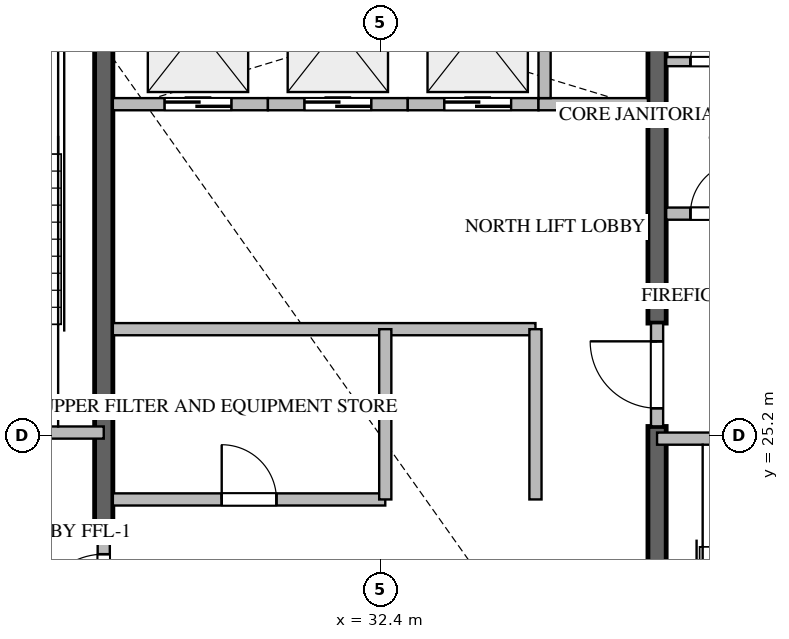
"""IFC4 building model, lengths in metres.
Left out: names, types, materials, properties, quantities, classifications, styles, units other than length and angle.
Written with IfcOpenShell. Run it as: python <this file> out.ifc"""

import sys

from ifc_helpers import new_model, si_unit, direction, frame, frame_2d, origin, place, context, subcontext, project, spatial, rectangle, extrude, source, transform, mapped, element, fill, save


model = new_model("IFC4")
c1 = context("Model", 3, precision=1e-05, world=origin(), true_north=direction((0.0, 1.0)))
c2 = subcontext(c1, "Body", "Model", "MODEL_VIEW")
j1 = project(units=[si_unit("LENGTHUNIT", "METRE"), si_unit("PLANEANGLEUNIT", "RADIAN")], contexts=[c1])
p1 = place(None, origin())
s1 = spatial("IfcSite", under=j1, at=p1, CompositionType="ELEMENT")
p2 = place(p1, origin())
s2 = spatial("IfcBuilding", under=s1, at=p2, CompositionType="ELEMENT")
p3 = place(p2, frame((0.0, 0.0, 214.3)))
s3 = spatial("IfcBuildingStorey", under=s2, at=p3, CompositionType="ELEMENT", Elevation=214.3)
p4 = place(p3, frame((27.85, 23.55, -0.26), z_axis=(0.0, 0.0, 1.0), x_axis=(0.0, 1.0, 0.0)))
e1 = element("IfcWall", 1, at=p4, inside=s3, PredefinedType="SHEAR", context=c2, shape_type="SweptSolid", body=[
    extrude(rectangle(XDim=9.875, YDim=0.3, at=frame_2d((4.938, 0.0))), origin(), (0.0, 0.0, 1.0), 3.848),
])
p5 = place(p3, frame((36.95, 16.975, -0.26), z_axis=(0.0, 0.0, 1.0), x_axis=(0.0, 1.0, 0.0)))
e2 = element("IfcWall", 2, at=p5, inside=s3, PredefinedType="SHEAR", context=c2, shape_type="SweptSolid", body=[
    extrude(rectangle(XDim=8.375, YDim=0.3, at=frame_2d((4.188, 0.0))), origin(), (0.0, 0.0, 1.0), 3.848),
])
p6 = place(p3, frame((36.95, 27.05, -0.26), z_axis=(0.0, 0.0, 1.0), x_axis=(0.0, 1.0, 0.0)))
e3 = element("IfcWall", 3, at=p6, inside=s3, PredefinedType="SHEAR", context=c2, shape_type="SweptSolid", body=[
    extrude(rectangle(XDim=6.375, YDim=0.3, at=frame_2d((3.188, 0.0))), origin(), (0.0, 0.0, 1.0), 3.848),
])
p7 = place(p3, frame((23.4, 25.25, 0.0), z_axis=(0.0, 0.0, 1.0), x_axis=(1.0, 0.0, 0.0)))
e4 = element("IfcWall", 4, at=p7, inside=s3, PredefinedType="STANDARD", context=c2, shape_type="SweptSolid", body=[
    extrude(rectangle(XDim=4.45, YDim=0.2, at=frame_2d((2.225, 0.0))), origin(), (0.0, 0.0, 1.0), 3.59),
])
p8 = place(p7, frame((1.65, 0.0, 0.0)))
e5 = element("IfcOpeningElement", 5, at=p8, cuts=e4, PredefinedType="OPENING", context=c2, shape_type="SweptSolid", body=[
    extrude(rectangle(XDim=1.1, YDim=2.15, at=frame_2d((0.55, 1.075))), frame((0.0, 0.11, 0.0), z_axis=(0.0, -1.0, 0.0), x_axis=(1.0, 0.0, 0.0)), (0.0, 0.0, 1.0), 0.22),
])
p9 = place(p3, frame((36.95, 25.15, 0.0), z_axis=(0.0, 0.0, 1.0), x_axis=(1.0, 0.0, 0.0)))
e6 = element("IfcWall", 6, at=p9, inside=s3, PredefinedType="STANDARD", context=c2, shape_type="SweptSolid", body=[
    extrude(rectangle(XDim=4.45, YDim=0.2, at=frame_2d((2.225, 0.0))), origin(), (0.0, 0.0, 1.0), 3.59),
])
p10 = place(p9, frame((1.65, 0.0, 0.0)))
e7 = element("IfcOpeningElement", 7, at=p10, cuts=e6, PredefinedType="OPENING", context=c2, shape_type="SweptSolid", body=[
    extrude(rectangle(XDim=1.1, YDim=2.15, at=frame_2d((0.55, 1.075))), frame((0.0, 0.11, 0.0), z_axis=(0.0, -1.0, 0.0), x_axis=(1.0, 0.0, 0.0)), (0.0, 0.0, 1.0), 0.22),
])
p11 = place(p3, frame((28.0, 30.65, 0.0), z_axis=(0.0, 0.0, 1.0), x_axis=(1.0, 0.0, 0.0)))
e8 = element("IfcWall", 8, at=p11, inside=s3, PredefinedType="STANDARD", context=c2, shape_type="SweptSolid", body=[
    extrude(rectangle(XDim=2.55, YDim=0.2, at=frame_2d((1.275, 0.0))), origin(), (0.0, 0.0, 1.0), 3.59),
])
p12 = place(p11, frame((0.85, 0.0, 0.0)))
e9 = element("IfcOpeningElement", 9, at=p12, cuts=e8, PredefinedType="OPENING", context=c2, shape_type="SweptSolid", body=[
    extrude(rectangle(XDim=1.1, YDim=2.2, at=frame_2d((0.55, 1.1))), frame((0.0, 0.11, 0.0), z_axis=(0.0, -1.0, 0.0), x_axis=(1.0, 0.0, 0.0)), (0.0, 0.0, 1.0), 0.22),
])
p13 = place(p3, frame((30.55, 30.65, 0.0), z_axis=(0.0, 0.0, 1.0), x_axis=(1.0, 0.0, 0.0)))
e10 = element("IfcWall", 10, at=p13, inside=s3, PredefinedType="STANDARD", context=c2, shape_type="SweptSolid", body=[
    extrude(rectangle(XDim=2.3, YDim=0.2, at=frame_2d((1.15, 0.0))), origin(), (0.0, 0.0, 1.0), 3.59),
])
p14 = place(p13, frame((0.6, 0.0, 0.0)))
e11 = element("IfcOpeningElement", 11, at=p14, cuts=e10, PredefinedType="OPENING", context=c2, shape_type="SweptSolid", body=[
    extrude(rectangle(XDim=1.1, YDim=2.2, at=frame_2d((0.55, 1.1))), frame((0.0, 0.11, 0.0), z_axis=(0.0, -1.0, 0.0), x_axis=(1.0, 0.0, 0.0)), (0.0, 0.0, 1.0), 0.22),
])
p15 = place(p3, frame((32.85, 30.65, 0.0), z_axis=(0.0, 0.0, 1.0), x_axis=(1.0, 0.0, 0.0)))
e12 = element("IfcWall", 12, at=p15, inside=s3, PredefinedType="STANDARD", context=c2, shape_type="SweptSolid", body=[
    extrude(rectangle(XDim=2.15, YDim=0.2, at=frame_2d((1.075, 0.0))), origin(), (0.0, 0.0, 1.0), 3.59),
])
p16 = place(p15, frame((0.6, 0.0, 0.0)))
e13 = element("IfcOpeningElement", 13, at=p16, cuts=e12, PredefinedType="OPENING", context=c2, shape_type="SweptSolid", body=[
    extrude(rectangle(XDim=1.1, YDim=2.2, at=frame_2d((0.55, 1.1))), frame((0.0, 0.11, 0.0), z_axis=(0.0, -1.0, 0.0), x_axis=(1.0, 0.0, 0.0)), (0.0, 0.0, 1.0), 0.22),
])
p17 = place(p3, frame((35.0, 30.65, 0.0), z_axis=(0.0, 0.0, 1.0), x_axis=(1.0, 0.0, 0.0)))
e14 = element("IfcWall", 14, at=p17, inside=s3, PredefinedType="STANDARD", context=c2, shape_type="SweptSolid", body=[
    extrude(rectangle(XDim=1.8, YDim=0.2, at=frame_2d((0.9, 0.0))), origin(), (0.0, 0.0, 1.0), 3.59),
])
p18 = place(p3, frame((35.1, 30.75, 0.0), z_axis=(0.0, 0.0, 1.0), x_axis=(0.0, 1.0, 0.0)))
e15 = element("IfcWall", 15, at=p18, inside=s3, PredefinedType="STANDARD", context=c2, shape_type="SweptSolid", body=[
    extrude(rectangle(XDim=2.675, YDim=0.2, at=frame_2d((1.337, 0.0))), origin(), (0.0, 0.0, 1.0), 3.59),
])
p19 = place(p3, frame((37.1, 28.85, 0.0), z_axis=(0.0, 0.0, 1.0), x_axis=(1.0, 0.0, 0.0)))
e16 = element("IfcWall", 16, at=p19, inside=s3, PredefinedType="STANDARD", context=c2, shape_type="SweptSolid", body=[
    extrude(rectangle(XDim=1.648, YDim=0.2, at=frame_2d((0.824, 0.0))), origin(), (0.0, 0.0, 1.0), 3.59),
])
p20 = place(p19, frame((0.399, 0.0, 0.0)))
e17 = element("IfcOpeningElement", 17, at=p20, cuts=e16, PredefinedType="OPENING", context=c2, shape_type="SweptSolid", body=[
    extrude(rectangle(XDim=0.85, YDim=2.1, at=frame_2d((0.425, 1.05))), frame((0.0, 0.11, 0.0), z_axis=(0.0, -1.0, 0.0), x_axis=(1.0, 0.0, 0.0)), (0.0, 0.0, 1.0), 0.22),
])
p21 = place(p3, frame((27.85, 21.852, 0.0), z_axis=(0.0, 0.0, 1.0), x_axis=(0.0, 1.0, 0.0)))
e18 = element("IfcWall", 18, at=p21, inside=s3, PredefinedType="STANDARD", context=c2, shape_type="SweptSolid", body=[
    extrude(rectangle(XDim=1.696, YDim=0.2, at=frame_2d((0.848, 0.0))), origin(), (0.0, 0.0, 1.0), 3.59),
])
p22 = place(p21, frame((0.298, 0.0, 0.0)))
e19 = element("IfcOpeningElement", 19, at=p22, cuts=e18, PredefinedType="OPENING", context=c2, shape_type="SweptSolid", body=[
    extrude(rectangle(XDim=1.1, YDim=2.15, at=frame_2d((0.55, 1.075))), frame((0.0, 0.11, 0.0), z_axis=(0.0, -1.0, 0.0), x_axis=(1.0, 0.0, 0.0)), (0.0, 0.0, 1.0), 0.22),
])
p23 = place(p3, frame((36.95, 25.352, 0.0), z_axis=(0.0, 0.0, 1.0), x_axis=(0.0, 1.0, 0.0)))
e20 = element("IfcWall", 20, at=p23, inside=s3, PredefinedType="STANDARD", context=c2, shape_type="SweptSolid", body=[
    extrude(rectangle(XDim=1.696, YDim=0.2, at=frame_2d((0.848, 0.0))), origin(), (0.0, 0.0, 1.0), 3.59),
])
p24 = place(p23, frame((0.298, 0.0, 0.0)))
e21 = element("IfcOpeningElement", 21, at=p24, cuts=e20, PredefinedType="OPENING", context=c2, shape_type="SweptSolid", body=[
    extrude(rectangle(XDim=1.1, YDim=2.15, at=frame_2d((0.55, 1.075))), frame((0.0, 0.11, 0.0), z_axis=(0.0, -1.0, 0.0), x_axis=(1.0, 0.0, 0.0)), (0.0, 0.0, 1.0), 0.22),
])
p25 = place(p3, frame((37.1, 31.35, 0.0), z_axis=(0.0, 0.0, 1.0), x_axis=(1.0, 0.0, 0.0)))
e22 = element("IfcWall", 22, at=p25, inside=s3, PredefinedType="PARTITIONING", context=c2, shape_type="SweptSolid", body=[
    extrude(rectangle(XDim=1.648, YDim=0.15, at=frame_2d((0.824, 0.0))), origin(), (0.0, 0.0, 1.0), 3.59),
])
p26 = place(p25, frame((0.399, 0.0, 0.0)))
e23 = element("IfcOpeningElement", 23, at=p26, cuts=e22, PredefinedType="OPENING", context=c2, shape_type="SweptSolid", body=[
    extrude(rectangle(XDim=0.85, YDim=2.1, at=frame_2d((0.425, 1.05))), frame((0.0, 0.085, 0.0), z_axis=(0.0, -1.0, 0.0), x_axis=(1.0, 0.0, 0.0)), (0.0, 0.0, 1.0), 0.17),
])
p27 = place(p3, frame((28.0, 26.95, 0.0), z_axis=(0.0, 0.0, 1.0), x_axis=(1.0, 0.0, 0.0)))
e24 = element("IfcWall", 24, at=p27, inside=s3, PredefinedType="STANDARD", context=c2, shape_type="SweptSolid", body=[
    extrude(rectangle(XDim=6.95, YDim=0.2, at=frame_2d((3.475, 0.0))), origin(), (0.0, 0.0, 1.0), 3.59),
])
p28 = place(p3, frame((34.95, 24.15, 0.0), z_axis=(0.0, 0.0, 1.0), x_axis=(0.0, 1.0, 0.0)))
e25 = element("IfcWall", 25, at=p28, inside=s3, PredefinedType="STANDARD", context=c2, shape_type="SweptSolid", body=[
    extrude(rectangle(XDim=2.8, YDim=0.2, at=frame_2d((1.4, 0.0))), origin(), (0.0, 0.0, 1.0), 3.59),
])
p29 = place(p3, frame((28.0, 24.15, 0.0), z_axis=(0.0, 0.0, 1.0), x_axis=(1.0, 0.0, 0.0)))
e26 = element("IfcWall", 26, at=p29, inside=s3, PredefinedType="STANDARD", context=c2, shape_type="SweptSolid", body=[
    extrude(rectangle(XDim=4.48, YDim=0.2, at=frame_2d((2.24, 0.0))), origin(), (0.0, 0.0, 1.0), 3.59),
])
p30 = place(p29, frame((1.79, 0.0, 0.0)))
e27 = element("IfcOpeningElement", 27, at=p30, cuts=e26, PredefinedType="OPENING", context=c2, shape_type="SweptSolid", body=[
    extrude(rectangle(XDim=0.9, YDim=2.1, at=frame_2d((0.45, 1.05))), frame((0.0, 0.11, 0.0), z_axis=(0.0, -1.0, 0.0), x_axis=(1.0, 0.0, 0.0)), (0.0, 0.0, 1.0), 0.22),
])
p31 = place(p3, frame((32.48, 24.15, 0.0), z_axis=(0.0, 0.0, 1.0), x_axis=(0.0, 1.0, 0.0)))
e28 = element("IfcWall", 28, at=p31, inside=s3, PredefinedType="STANDARD", context=c2, shape_type="SweptSolid", body=[
    extrude(rectangle(XDim=2.8, YDim=0.2, at=frame_2d((1.4, 0.0))), origin(), (0.0, 0.0, 1.0), 3.59),
])
m1 = source(origin(), c2, "Body", "SweptSolid", [
    extrude(rectangle(XDim=1.1, YDim=2.2, at=frame_2d((0.55, 1.1))), frame((0.0, 0.025, 0.0), z_axis=(0.0, -1.0, 0.0), x_axis=(1.0, 0.0, 0.0)), (0.0, 0.0, 1.0), 0.05),
])
p32 = place(p12, origin())
e29 = element("IfcDoor", 29, at=p32, inside=s3, OperationType="DOUBLE_DOOR_SLIDING", PredefinedType="DOOR", context=c2, shape_type="MappedRepresentation", body=[
    mapped(m1, transform((0.0, 0.0, 0.0), scale=1.0)),
])
fill(e9, e29)
p33 = place(p14, origin())
e30 = element("IfcDoor", 30, at=p33, inside=s3, OperationType="DOUBLE_DOOR_SLIDING", PredefinedType="DOOR", context=c2, shape_type="MappedRepresentation", body=[
    mapped(m1, transform((0.0, 0.0, 0.0), scale=1.0)),
])
fill(e11, e30)
p34 = place(p16, origin())
e31 = element("IfcDoor", 31, at=p34, inside=s3, OperationType="DOUBLE_DOOR_SLIDING", PredefinedType="DOOR", context=c2, shape_type="MappedRepresentation", body=[
    mapped(m1, transform((0.0, 0.0, 0.0), scale=1.0)),
])
fill(e13, e31)
m2 = source(origin(), c2, "Body", "SweptSolid", [
    extrude(rectangle(XDim=0.85, YDim=2.1, at=frame_2d((0.425, 1.05))), frame((0.0, 0.025, 0.0), z_axis=(0.0, -1.0, 0.0), x_axis=(1.0, 0.0, 0.0)), (0.0, 0.0, 1.0), 0.05),
])
p35 = place(p20, origin())
e32 = element("IfcDoor", 32, at=p35, inside=s3, OperationType="SINGLE_SWING_RIGHT", PredefinedType="DOOR", context=c2, shape_type="MappedRepresentation", body=[
    mapped(m2, transform((0.0, 0.0, 0.0), scale=1.0)),
])
fill(e17, e32)
m3 = source(origin(), c2, "Body", "SweptSolid", [
    extrude(rectangle(XDim=1.1, YDim=2.15, at=frame_2d((0.55, 1.075))), frame((0.0, 0.025, 0.0), z_axis=(0.0, -1.0, 0.0), x_axis=(1.0, 0.0, 0.0)), (0.0, 0.0, 1.0), 0.05),
])
p36 = place(p22, origin())
e33 = element("IfcDoor", 33, at=p36, inside=s3, OperationType="SINGLE_SWING_LEFT", PredefinedType="DOOR", context=c2, shape_type="MappedRepresentation", body=[
    mapped(m3, transform((0.0, 0.0, 0.0), scale=1.0)),
])
fill(e19, e33)
p37 = place(p24, origin())
e34 = element("IfcDoor", 34, at=p37, inside=s3, OperationType="SINGLE_SWING_RIGHT", PredefinedType="DOOR", context=c2, shape_type="MappedRepresentation", body=[
    mapped(m3, transform((0.0, 0.0, 0.0), scale=1.0)),
])
fill(e21, e34)
p38 = place(p26, origin())
e35 = element("IfcDoor", 35, at=p38, inside=s3, OperationType="SINGLE_SWING_RIGHT", PredefinedType="DOOR", context=c2, shape_type="MappedRepresentation", body=[
    mapped(m2, transform((0.0, 0.0, 0.0), scale=1.0)),
])
fill(e23, e35)
m4 = source(origin(), c2, "Body", "SweptSolid", [
    extrude(rectangle(XDim=0.9, YDim=2.1, at=frame_2d((0.45, 1.05))), frame((0.0, 0.025, 0.0), z_axis=(0.0, -1.0, 0.0), x_axis=(1.0, 0.0, 0.0)), (0.0, 0.0, 1.0), 0.05),
])
p39 = place(p30, origin())
e36 = element("IfcDoor", 36, at=p39, inside=s3, OperationType="SINGLE_SWING_LEFT", PredefinedType="DOOR", context=c2, shape_type="MappedRepresentation", body=[
    mapped(m4, transform((0.0, 0.0, 0.0), scale=1.0)),
])
fill(e27, e36)
save(model, sys.argv[1])
